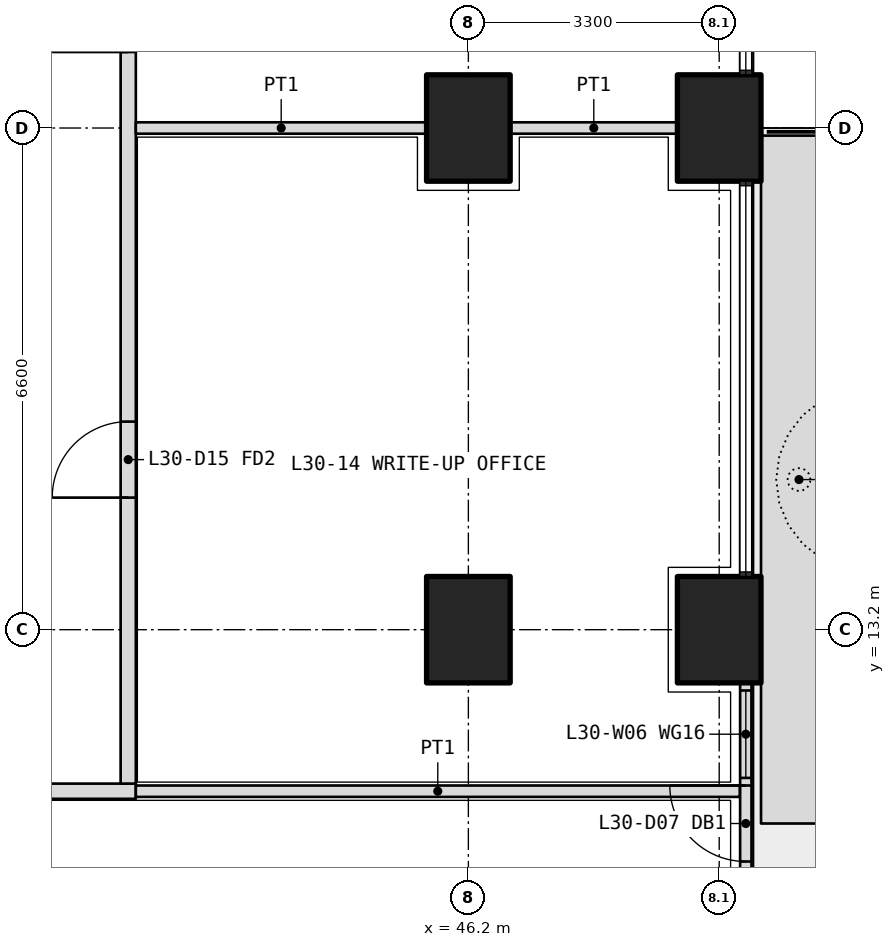
"""IFC4 building model, lengths in metres.
Left out: names, types, materials, properties, quantities, classifications, styles, units other than length and angle.
Written with IfcOpenShell. Run it as: python <this file> out.ifc"""

import sys

from ifc_helpers import new_model, si_unit, direction, frame, frame_2d, origin, origin_2d, place, context, subcontext, project, spatial, polyline, rectangle, outline, extrude, element, fill, save


model = new_model("IFC4")
c1 = context("Model", 3, precision=1e-05, world=origin(), true_north=direction((0.0, 1.0)))
c2 = subcontext(c1, "Body", "Model", "MODEL_VIEW")
j1 = project(units=[si_unit("LENGTHUNIT", "METRE"), si_unit("PLANEANGLEUNIT", "RADIAN")], contexts=[c1])
p1 = place(None, origin())
s1 = spatial("IfcSite", under=j1, at=p1, CompositionType="ELEMENT")
p2 = place(p1, origin())
s2 = spatial("IfcBuilding", under=s1, at=p2, CompositionType="ELEMENT")
p3 = place(p2, frame((0.0, 0.0, 132.6)))
s3 = spatial("IfcBuildingStorey", under=s2, at=p3, CompositionType="ELEMENT", Elevation=132.6)
for number, where, z_axis, x_axis in (
    (1, (49.5, 13.2, 0.0), (0.0, 0.0, 1.0), (0.0, 1.0, 0.0)),
    (2, (49.5, 19.8, 0.0), (0.0, 0.0, 1.0), (0.0, 1.0, 0.0)),
    (3, (46.2, 13.2, 0.0), (0.0, 0.0, 1.0), (0.0, 1.0, 0.0)),
    (4, (46.2, 19.8, 0.0), (0.0, 0.0, 1.0), (0.0, 1.0, 0.0)),
):
    element("IfcColumn", number, at=place(p3, frame(where, z_axis=z_axis, x_axis=x_axis)), inside=s3, PredefinedType="COLUMN", context=c2, shape_type="SweptSolid", body=[
        extrude(rectangle(XDim=1.4, YDim=1.1, at=origin_2d()), origin(), (0.0, 0.0, 1.0), 4.2),
    ])
p4 = place(p3, origin())
e5 = element("IfcWall", 5, at=p4, inside=s3, PredefinedType="USERDEFINED", context=c2, shape_type="SweptSolid", body=[
    extrude(outline(polyline([(50.05, 10.65), (51.05, 10.65), (51.05, 19.7), (50.05, 19.7), (50.05, 10.65)]), holes=[polyline([(50.2, 10.8), (50.9, 10.8), (50.9, 19.55), (50.2, 19.55), (50.2, 10.8)])]), origin(), (0.0, 0.0, 1.0), 1.05),
])
p5 = place(p3, frame((49.85, 7.3, 0.0), z_axis=(0.0, 0.0, 1.0), x_axis=(0.0, 1.0, 0.0)))
e6 = element("IfcWall", 6, at=p5, inside=s3, PredefinedType="SOLIDWALL", context=c2, shape_type="SweptSolid", body=[
    extrude(rectangle(XDim=5.2, YDim=0.15, at=frame_2d((2.6, 0.0))), origin(), (0.0, 0.0, 1.0), 2.7),
])
p6 = place(p5, frame((2.85, 0.0, 0.0)))
e7 = element("IfcOpeningElement", 7, at=p6, cuts=e6, PredefinedType="OPENING", context=c2, shape_type="SweptSolid", body=[
    extrude(rectangle(XDim=1.0, YDim=2.4, at=frame_2d((0.5, 1.2))), frame((0.0, 0.085, 0.0), z_axis=(0.0, -1.0, 0.0), x_axis=(1.0, 0.0, 0.0)), (0.0, 0.0, 1.0), 0.17),
])
p7 = place(p5, frame((0.1, 0.0, 0.1)))
e8 = element("IfcOpeningElement", 8, at=p7, cuts=e6, PredefinedType="OPENING", context=c2, shape_type="SweptSolid", body=[
    extrude(rectangle(XDim=2.25, YDim=2.3, at=frame_2d((1.125, 1.15))), frame((0.0, 0.085, 0.0), z_axis=(0.0, -1.0, 0.0), x_axis=(1.0, 0.0, 0.0)), (0.0, 0.0, 1.0), 0.17),
])
p8 = place(p5, frame((3.95, 0.0, 0.1)))
e9 = element("IfcOpeningElement", 9, at=p8, cuts=e6, PredefinedType="OPENING", context=c2, shape_type="SweptSolid", body=[
    extrude(rectangle(XDim=1.15, YDim=2.3, at=frame_2d((0.575, 1.15))), frame((0.0, 0.085, 0.0), z_axis=(0.0, -1.0, 0.0), x_axis=(1.0, 0.0, 0.0)), (0.0, 0.0, 1.0), 0.17),
])
p9 = place(p3, frame((29.7, 11.075, 0.0), z_axis=(0.0, 0.0, 1.0), x_axis=(1.0, 0.0, 0.0)))
e10 = element("IfcWall", 10, at=p9, inside=s3, PredefinedType="PARTITIONING", context=c2, shape_type="SweptSolid", body=[
    extrude(rectangle(XDim=12.125, YDim=0.2, at=frame_2d((6.062, 0.0))), origin(), (0.0, 0.0, 1.0), 2.85),
])
p10 = place(p9, frame((1.6, 0.0, 0.0)))
e11 = element("IfcOpeningElement", 11, at=p10, cuts=e10, PredefinedType="OPENING", context=c2, shape_type="SweptSolid", body=[
    extrude(rectangle(XDim=1.0, YDim=2.1, at=frame_2d((0.5, 1.05))), frame((0.0, 0.11, 0.0), z_axis=(0.0, -1.0, 0.0), x_axis=(1.0, 0.0, 0.0)), (0.0, 0.0, 1.0), 0.22),
])
p11 = place(p9, frame((4.9, 0.0, 0.0)))
e12 = element("IfcOpeningElement", 12, at=p11, cuts=e10, PredefinedType="OPENING", context=c2, shape_type="SweptSolid", body=[
    extrude(rectangle(XDim=1.0, YDim=2.1, at=frame_2d((0.5, 1.05))), frame((0.0, 0.11, 0.0), z_axis=(0.0, -1.0, 0.0), x_axis=(1.0, 0.0, 0.0)), (0.0, 0.0, 1.0), 0.22),
])
p12 = place(p9, frame((8.812, 0.0, 0.0)))
e13 = element("IfcOpeningElement", 13, at=p12, cuts=e10, PredefinedType="OPENING", context=c2, shape_type="SweptSolid", body=[
    extrude(rectangle(XDim=1.0, YDim=2.1, at=frame_2d((0.5, 1.05))), frame((0.0, 0.11, 0.0), z_axis=(0.0, -1.0, 0.0), x_axis=(1.0, 0.0, 0.0)), (0.0, 0.0, 1.0), 0.22),
])
p13 = place(p3, frame((41.725, 11.175, 0.0), z_axis=(0.0, 0.0, 1.0), x_axis=(0.0, 1.0, 0.0)))
e14 = element("IfcWall", 14, at=p13, inside=s3, PredefinedType="PARTITIONING", context=c2, shape_type="SweptSolid", body=[
    extrude(rectangle(XDim=27.625, YDim=0.2, at=frame_2d((13.812, 0.0))), origin(), (0.0, 0.0, 1.0), 2.85),
])
p14 = place(p13, frame((3.762, 0.0, 0.0)))
e15 = element("IfcOpeningElement", 15, at=p14, cuts=e14, PredefinedType="OPENING", context=c2, shape_type="SweptSolid", body=[
    extrude(rectangle(XDim=1.0, YDim=2.1, at=frame_2d((0.5, 1.05))), frame((0.0, 0.11, 0.0), z_axis=(0.0, -1.0, 0.0), x_axis=(1.0, 0.0, 0.0)), (0.0, 0.0, 1.0), 0.22),
])
p15 = place(p13, frame((9.625, 0.0, 0.0)))
e16 = element("IfcOpeningElement", 16, at=p15, cuts=e14, PredefinedType="OPENING", context=c2, shape_type="SweptSolid", body=[
    extrude(rectangle(XDim=1.0, YDim=2.1, at=frame_2d((0.5, 1.05))), frame((0.0, 0.11, 0.0), z_axis=(0.0, -1.0, 0.0), x_axis=(1.0, 0.0, 0.0)), (0.0, 0.0, 1.0), 0.22),
])
p16 = place(p13, frame((12.975, 0.0, 0.0)))
e17 = element("IfcOpeningElement", 17, at=p16, cuts=e14, PredefinedType="OPENING", context=c2, shape_type="SweptSolid", body=[
    extrude(rectangle(XDim=0.9, YDim=2.1, at=frame_2d((0.45, 1.05))), frame((0.0, 0.11, 0.0), z_axis=(0.0, -1.0, 0.0), x_axis=(1.0, 0.0, 0.0)), (0.0, 0.0, 1.0), 0.22),
])
p17 = place(p13, frame((19.675, 0.0, 0.0)))
e18 = element("IfcOpeningElement", 18, at=p17, cuts=e14, PredefinedType="OPENING", context=c2, shape_type="SweptSolid", body=[
    extrude(rectangle(XDim=1.0, YDim=2.1, at=frame_2d((0.5, 1.05))), frame((0.0, 0.11, 0.0), z_axis=(0.0, -1.0, 0.0), x_axis=(1.0, 0.0, 0.0)), (0.0, 0.0, 1.0), 0.22),
])
p18 = place(p13, frame((25.925, 0.0, 0.0)))
e19 = element("IfcOpeningElement", 19, at=p18, cuts=e14, PredefinedType="OPENING", context=c2, shape_type="SweptSolid", body=[
    extrude(rectangle(XDim=1.0, YDim=2.1, at=frame_2d((0.5, 1.05))), frame((0.0, 0.11, 0.0), z_axis=(0.0, -1.0, 0.0), x_axis=(1.0, 0.0, 0.0)), (0.0, 0.0, 1.0), 0.22),
])
p19 = place(p3, frame((49.77, 11.075, 0.0), z_axis=(0.0, 0.0, 1.0), x_axis=(-1.0, 0.0, 0.0)))
e20 = element("IfcWall", 20, at=p19, inside=s3, PredefinedType="PARTITIONING", context=c2, shape_type="SweptSolid", body=[
    extrude(rectangle(XDim=7.945, YDim=0.15, at=frame_2d((3.973, 0.0))), origin(), (0.0, 0.0, 1.0), 2.7),
])
p20 = place(p3, frame((48.95, 19.8, 0.0), z_axis=(0.0, 0.0, 1.0), x_axis=(-1.0, 0.0, 0.0)))
e21 = element("IfcWall", 21, at=p20, inside=s3, PredefinedType="PARTITIONING", context=c2, shape_type="SweptSolid", body=[
    extrude(rectangle(XDim=2.2, YDim=0.15, at=frame_2d((1.1, 0.0))), origin(), (0.0, 0.0, 1.0), 2.85),
])
p21 = place(p3, frame((45.65, 19.8, 0.0), z_axis=(0.0, 0.0, 1.0), x_axis=(-1.0, 0.0, 0.0)))
e22 = element("IfcWall", 22, at=p21, inside=s3, PredefinedType="PARTITIONING", context=c2, shape_type="SweptSolid", body=[
    extrude(rectangle(XDim=3.825, YDim=0.15, at=frame_2d((1.913, 0.0))), origin(), (0.0, 0.0, 1.0), 2.85),
])
p22 = place(p6, origin())
e23 = element("IfcDoor", 23, at=p22, inside=s3, OperationType="SINGLE_SWING_RIGHT", PredefinedType="DOOR", context=c2, shape_type="SweptSolid", body=[
    extrude(rectangle(XDim=1.0, YDim=2.4, at=frame_2d((0.5, 1.2))), frame((0.0, 0.025, 0.0), z_axis=(0.0, -1.0, 0.0), x_axis=(1.0, 0.0, 0.0)), (0.0, 0.0, 1.0), 0.05),
])
fill(e7, e23)
p23 = place(p8, origin())
e24 = element("IfcWindow", 24, at=p23, inside=s3, PartitioningType="SINGLE_PANEL", PredefinedType="WINDOW", context=c2, shape_type="SweptSolid", body=[
    extrude(rectangle(XDim=1.15, YDim=2.3, at=frame_2d((0.575, 1.15))), frame((0.0, 0.03, 0.0), z_axis=(0.0, -1.0, 0.0), x_axis=(1.0, 0.0, 0.0)), (0.0, 0.0, 1.0), 0.06),
])
fill(e9, e24)
p24 = place(p14, origin())
e25 = element("IfcDoor", 25, at=p24, inside=s3, OperationType="SINGLE_SWING_LEFT", PredefinedType="DOOR", context=c2, shape_type="SweptSolid", body=[
    extrude(rectangle(XDim=1.0, YDim=2.1, at=frame_2d((0.5, 1.05))), frame((0.0, 0.025, 0.0), z_axis=(0.0, -1.0, 0.0), x_axis=(1.0, 0.0, 0.0)), (0.0, 0.0, 1.0), 0.05),
])
fill(e15, e25)
save(model, sys.argv[1])
